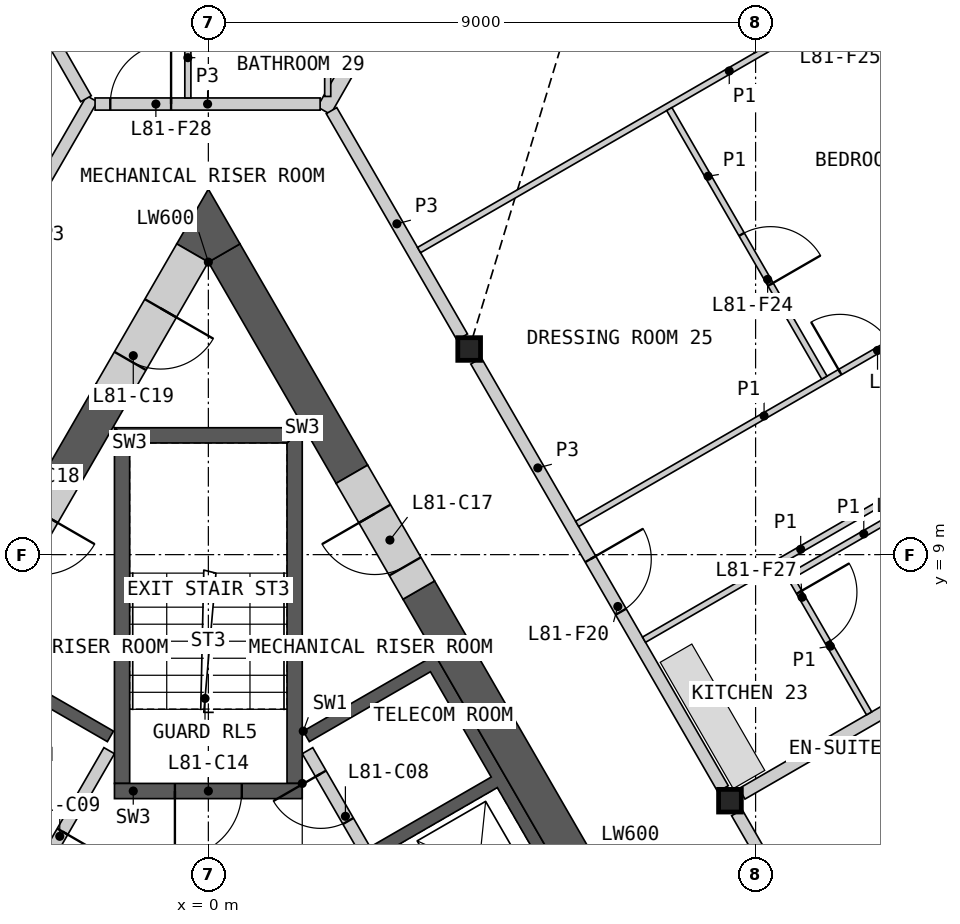
"""IFC4 building model, lengths in metres.
Left out: names, types, materials, properties, quantities, classifications, styles, units other than length and angle.
Written with IfcOpenShell. Run it as: python <this file> out.ifc"""

import sys

from ifc_helpers import new_model, si_unit, direction, frame, frame_2d, origin, origin_2d, place, context, subcontext, project, spatial, polyline, rectangle, i_section, outline, extrude, element, fill, save


model = new_model("IFC4")
c1 = context("Model", 3, precision=1e-05, world=origin(), true_north=direction((0.0, 1.0)))
c2 = subcontext(c1, "Body", "Model", "MODEL_VIEW")
j1 = project(units=[si_unit("LENGTHUNIT", "METRE"), si_unit("PLANEANGLEUNIT", "RADIAN")], contexts=[c1])
p1 = place(None, origin())
s1 = spatial("IfcSite", under=j1, at=p1, CompositionType="ELEMENT")
p2 = place(p1, origin())
s2 = spatial("IfcBuilding", under=s1, at=p2, CompositionType="ELEMENT")
p3 = place(p2, frame((0.0, 0.0, 364.4)))
s3 = spatial("IfcBuildingStorey", under=s2, at=p3, CompositionType="ELEMENT", Elevation=364.4)
for number, where, z_axis, x_axis in (
    (1, (8.578, 4.953, 0.0), (0.0, 0.0, 1.0), (1.0, 0.0, 0.0)),
    (2, (4.289, 12.382, 0.0), (0.0, 0.0, 1.0), (1.0, 0.0, 0.0)),
):
    element("IfcColumn", number, at=place(p3, frame(where, z_axis=z_axis, x_axis=x_axis)), inside=s3, PredefinedType="COLUMN", context=c2, shape_type="SweptSolid", body=[
        extrude(i_section(OverallWidth=0.374, OverallDepth=0.372, WebThickness=0.016, FlangeThickness=0.026, at=origin_2d()), origin(), (0.0, 0.0, 1.0), 3.4),
    ])
p4 = place(p3, origin())
e3 = element("IfcWall", 3, at=p4, inside=s3, PredefinedType="SHEAR", context=c2, shape_type="SweptSolid", body=[
    extrude(outline(polyline([(1.561, 6.097), (3.731, 7.35), (8.231, -0.444), (6.061, -1.697), (5.96, -1.524), (7.952, -0.374), (6.952, 1.358), (4.96, 0.208), (4.861, 0.381), (6.852, 1.531), (5.852, 3.263), (3.861, 2.113), (3.76, 2.287), (5.752, 3.437), (4.752, 5.169), (2.76, 4.019), (2.66, 4.192), (4.652, 5.342), (3.652, 7.074), (1.66, 5.924), (1.561, 6.097)])), origin(), (0.0, 0.0, 1.0), 3.1),
])
p5 = place(p3, frame((5.817, -1.476, 0.0), z_axis=(0.0, 0.0, 1.0), x_axis=(-0.500002616675, 0.866023893041, 0.0)))
e4 = element("IfcWall", 4, at=p5, inside=s3, PredefinedType="SOLIDWALL", context=c2, shape_type="SweptSolid", body=[
    extrude(rectangle(XDim=8.373, YDim=0.2, at=frame_2d((4.187, 0.0))), origin(), (0.0, 0.0, 1.0), 3.1),
])
p6 = place(p5, frame((0.337, 0.0, 0.0)))
e5 = element("IfcOpeningElement", 5, at=p6, cuts=e4, PredefinedType="OPENING", context=c2, shape_type="SweptSolid", body=[
    extrude(rectangle(XDim=1.1, YDim=2.1, at=frame_2d((0.55, 1.05))), frame((0.0, 0.11, 0.0), z_axis=(0.0, -1.0, 0.0), x_axis=(1.0, 0.0, 0.0)), (0.0, 0.0, 1.0), 0.22),
])
p7 = place(p5, frame((2.537, 0.0, 0.0)))
e6 = element("IfcOpeningElement", 6, at=p7, cuts=e4, PredefinedType="OPENING", context=c2, shape_type="SweptSolid", body=[
    extrude(rectangle(XDim=1.1, YDim=2.1, at=frame_2d((0.55, 1.05))), frame((0.0, 0.11, 0.0), z_axis=(0.0, -1.0, 0.0), x_axis=(1.0, 0.0, 0.0)), (0.0, 0.0, 1.0), 0.22),
])
p8 = place(p5, frame((4.737, 0.0, 0.0)))
e7 = element("IfcOpeningElement", 7, at=p8, cuts=e4, PredefinedType="OPENING", context=c2, shape_type="SweptSolid", body=[
    extrude(rectangle(XDim=1.1, YDim=2.1, at=frame_2d((0.55, 1.05))), frame((0.0, 0.11, 0.0), z_axis=(0.0, -1.0, 0.0), x_axis=(1.0, 0.0, 0.0)), (0.0, 0.0, 1.0), 0.22),
])
p9 = place(p5, frame((7.037, 0.0, 0.0)))
e8 = element("IfcOpeningElement", 8, at=p9, cuts=e4, PredefinedType="OPENING", context=c2, shape_type="SweptSolid", body=[
    extrude(rectangle(XDim=0.9, YDim=2.1, at=frame_2d((0.45, 1.05))), frame((0.0, 0.11, 0.0), z_axis=(0.0, -1.0, 0.0), x_axis=(1.0, 0.0, 0.0)), (0.0, 0.0, 1.0), 0.22),
])
p10 = place(p3, origin())
e9 = element("IfcWall", 9, at=p10, inside=s3, PredefinedType="SHEAR", context=c2, shape_type="SweptSolid", body=[
    extrude(outline(polyline([(-4.96, 0.208), (-7.131, 1.461), (-3.731, 7.35), (-1.561, 6.097), (-1.66, 5.924), (-3.652, 7.074), (-5.752, 3.437), (-3.76, 2.287), (-3.861, 2.113), (-5.852, 3.263), (-6.852, 1.531), (-4.861, 0.381), (-4.96, 0.208)])), origin(), (0.0, 0.0, 1.0), 3.1),
])
p11 = place(p3, frame((-1.631, 5.776, 0.0), z_axis=(0.0, 0.0, 1.0), x_axis=(-0.499992876559, -0.866029516466, 0.0)))
e10 = element("IfcWall", 10, at=p11, inside=s3, PredefinedType="SOLIDWALL", context=c2, shape_type="SweptSolid", body=[
    extrude(rectangle(XDim=6.486, YDim=0.2, at=frame_2d((3.243, 0.0))), origin(), (0.0, 0.0, 1.0), 3.1),
])
p12 = place(p11, frame((1.537, 0.0, 0.0)))
e11 = element("IfcOpeningElement", 11, at=p12, cuts=e10, PredefinedType="OPENING", context=c2, shape_type="SweptSolid", body=[
    extrude(rectangle(XDim=0.9, YDim=2.1, at=frame_2d((0.45, 1.05))), frame((0.0, 0.11, 0.0), z_axis=(0.0, -1.0, 0.0), x_axis=(1.0, 0.0, 0.0)), (0.0, 0.0, 1.0), 0.22),
])
p13 = place(p11, frame((4.837, 0.0, 0.0)))
e12 = element("IfcOpeningElement", 12, at=p13, cuts=e10, PredefinedType="OPENING", context=c2, shape_type="SweptSolid", body=[
    extrude(rectangle(XDim=0.9, YDim=2.1, at=frame_2d((0.45, 1.05))), frame((0.0, 0.11, 0.0), z_axis=(0.0, -1.0, 0.0), x_axis=(1.0, 0.0, 0.0)), (0.0, 0.0, 1.0), 0.22),
])
p14 = place(p3, origin())
e13 = element("IfcWall", 13, at=p14, inside=s3, PredefinedType="SHEAR", context=c2, shape_type="SweptSolid", body=[
    extrude(outline(polyline([(1.544, 5.237), (1.544, 11.087), (1.294, 10.837), (1.294, 5.237), (1.544, 5.237)])), origin(), (0.0, 0.0, 1.0), 3.1),
])
p15 = place(p3, origin())
e14 = element("IfcWall", 14, at=p15, inside=s3, PredefinedType="SHEAR", context=c2, shape_type="SweptSolid", body=[
    extrude(outline(polyline([(1.544, 11.087), (-1.544, 11.087), (-1.294, 10.837), (1.294, 10.837), (1.544, 11.087)])), origin(), (0.0, 0.0, 1.0), 3.1),
])
p16 = place(p3, origin())
e15 = element("IfcWall", 15, at=p16, inside=s3, PredefinedType="SHEAR", context=c2, shape_type="SweptSolid", body=[
    extrude(outline(polyline([(-1.294, 10.837), (-1.544, 11.087), (-1.544, 5.237), (-1.294, 5.237), (-1.294, 10.837)])), origin(), (0.0, 0.0, 1.0), 3.1),
])
p17 = place(p3, frame((1.544, 5.112, 0.0), z_axis=(0.0, 0.0, 1.0), x_axis=(-1.0, 0.0, 0.0)))
e16 = element("IfcWall", 16, at=p17, inside=s3, PredefinedType="SHEAR", context=c2, shape_type="SweptSolid", body=[
    extrude(rectangle(XDim=3.088, YDim=0.25, at=frame_2d((1.544, 0.0))), origin(), (0.0, 0.0, 1.0), 3.1),
])
p18 = place(p17, frame((0.994, 0.0, 0.0)))
e17 = element("IfcOpeningElement", 17, at=p18, cuts=e16, PredefinedType="OPENING", context=c2, shape_type="SweptSolid", body=[
    extrude(rectangle(XDim=1.1, YDim=2.1, at=frame_2d((0.55, 1.05))), frame((0.0, 0.135, 0.0), z_axis=(0.0, -1.0, 0.0), x_axis=(1.0, 0.0, 0.0)), (0.0, 0.0, 1.0), 0.27),
])
p19 = place(p3, frame((8.686, -0.634, 0.0), z_axis=(0.0, 0.0, 1.0), x_axis=(-0.50001836461, 0.866014800712, 0.0)))
e18 = element("IfcWall", 18, at=p19, inside=s3, PredefinedType="SHEAR", context=c2, shape_type="SweptSolid", body=[
    extrude(rectangle(XDim=10.451, YDim=0.6, at=frame_2d((5.225, 0.0))), origin(), (0.0, 0.0, 1.0), 3.1),
])
p20 = place(p3, frame((2.361, 10.322, 0.0), z_axis=(0.0, 0.0, 1.0), x_axis=(-0.500000735859, 0.866024978935, 0.0)))
e19 = element("IfcWall", 19, at=p20, inside=s3, PredefinedType="SHEAR", context=c2, shape_type="SweptSolid", body=[
    extrude(rectangle(XDim=4.202, YDim=0.6, at=frame_2d((2.101, 0.0))), origin(), (0.0, 0.0, 1.0), 3.1),
])
p21 = place(p3, frame((-1.59, 11.658, 0.0), z_axis=(0.0, 0.0, 1.0), x_axis=(-0.500037594623, -0.866003697431, 0.0)))
e20 = element("IfcWall", 20, at=p21, inside=s3, PredefinedType="SHEAR", context=c2, shape_type="SweptSolid", body=[
    extrude(rectangle(XDim=1.542, YDim=0.6, at=frame_2d((0.771, 0.0))), origin(), (0.0, 0.0, 1.0), 3.1),
])
p22 = place(p3, origin())
e21 = element("IfcWall", 21, at=p22, inside=s3, PredefinedType="SHEAR", context=c2, shape_type="SweptSolid", body=[
    extrude(outline(polyline([(0.0, 13.811), (-0.52, 14.111), (0.0, 15.011), (0.52, 14.111), (0.0, 13.811)])), origin(), (0.0, 0.0, 1.0), 3.1),
])
p23 = place(p3, frame((3.461, 8.417, 0.0), z_axis=(0.0, 0.0, 1.0), x_axis=(-0.499946605688, 0.86605622881, 0.0)))
e22 = element("IfcWall", 22, at=p23, inside=s3, PredefinedType="SHEAR", context=c2, shape_type="SweptSolid", body=[
    extrude(rectangle(XDim=2.2, YDim=0.6, at=frame_2d((1.1, 0.0))), origin(), (0.0, 0.0, 1.0), 3.1),
])
p24 = place(p23, frame((0.45, 0.0, 0.0)))
e23 = element("IfcOpeningElement", 23, at=p24, cuts=e22, PredefinedType="OPENING", context=c2, shape_type="SweptSolid", body=[
    extrude(rectangle(XDim=1.0, YDim=2.1, at=frame_2d((0.5, 1.05))), frame((0.0, 0.31, 0.0), z_axis=(0.0, -1.0, 0.0), x_axis=(1.0, 0.0, 0.0)), (0.0, 0.0, 1.0), 0.62),
])
p25 = place(p3, frame((-2.361, 10.322, 0.0), z_axis=(0.0, 0.0, 1.0), x_axis=(-0.499946605688, -0.86605622881, 0.0)))
e24 = element("IfcWall", 24, at=p25, inside=s3, PredefinedType="SHEAR", context=c2, shape_type="SweptSolid", body=[
    extrude(rectangle(XDim=2.2, YDim=0.6, at=frame_2d((1.1, 0.0))), origin(), (0.0, 0.0, 1.0), 3.1),
])
p26 = place(p25, frame((0.75, 0.0, 0.0)))
e25 = element("IfcOpeningElement", 25, at=p26, cuts=e24, PredefinedType="OPENING", context=c2, shape_type="SweptSolid", body=[
    extrude(rectangle(XDim=1.0, YDim=2.1, at=frame_2d((0.5, 1.05))), frame((0.0, 0.31, 0.0), z_axis=(0.0, -1.0, 0.0), x_axis=(1.0, 0.0, 0.0)), (0.0, 0.0, 1.0), 0.62),
])
p27 = place(p3, frame((-0.26, 13.961, 0.0), z_axis=(0.0, 0.0, 1.0), x_axis=(-0.49997936161, -0.866037319036, 0.0)))
e26 = element("IfcWall", 26, at=p27, inside=s3, PredefinedType="SHEAR", context=c2, shape_type="SweptSolid", body=[
    extrude(rectangle(XDim=2.66, YDim=0.6, at=frame_2d((1.33, 0.0))), origin(), (0.0, 0.0, 1.0), 3.1),
])
p28 = place(p27, frame((1.05, 0.0, 0.0)))
e27 = element("IfcOpeningElement", 27, at=p28, cuts=e26, PredefinedType="OPENING", context=c2, shape_type="SweptSolid", body=[
    extrude(rectangle(XDim=1.0, YDim=2.1, at=frame_2d((0.5, 1.05))), frame((0.0, 0.31, 0.0), z_axis=(0.0, -1.0, 0.0), x_axis=(1.0, 0.0, 0.0)), (0.0, 0.0, 1.0), 0.62),
])
p29 = place(p3, frame((1.901, 16.302, 0.0), z_axis=(0.0, 0.0, 1.0), x_axis=(0.496368960053, 0.86811166073, 0.0)))
e28 = element("IfcWall", 28, at=p29, inside=s3, PredefinedType="PARTITIONING", context=c2, shape_type="SweptSolid", body=[
    extrude(rectangle(XDim=14.972, YDim=0.25, at=frame_2d((7.486, 0.0))), origin(), (0.0, 0.0, 1.0), 2.33),
])
p30 = place(p3, frame((4.403, 12.185, 0.0), z_axis=(0.0, 0.0, 1.0), x_axis=(0.499992155518, -0.866029932751, 0.0)))
e29 = element("IfcWall", 29, at=p30, inside=s3, PredefinedType="PARTITIONING", context=c2, shape_type="SweptSolid", body=[
    extrude(rectangle(XDim=8.123, YDim=0.2, at=frame_2d((4.062, 0.0))), origin(), (0.0, 0.0, 1.0), 3.1),
])
p31 = place(p30, frame((3.762, 0.0, 0.0)))
e30 = element("IfcOpeningElement", 30, at=p31, cuts=e29, PredefinedType="OPENING", context=c2, shape_type="SweptSolid", body=[
    extrude(rectangle(XDim=1.0, YDim=2.1, at=frame_2d((0.5, 1.05))), frame((0.0, 0.11, 0.0), z_axis=(0.0, -1.0, 0.0), x_axis=(1.0, 0.0, 0.0)), (0.0, 0.0, 1.0), 0.22),
])
p32 = place(p3, frame((8.692, 4.756, 0.0), z_axis=(0.0, 0.0, 1.0), x_axis=(0.500001682468, -0.866024432409, 0.0)))
e31 = element("IfcWall", 31, at=p32, inside=s3, PredefinedType="PARTITIONING", context=c2, shape_type="SweptSolid", body=[
    extrude(rectangle(XDim=8.124, YDim=0.2, at=frame_2d((4.062, 0.0))), origin(), (0.0, 0.0, 1.0), 3.1),
])
p33 = place(p32, frame((3.587, 0.0, 0.0)))
e32 = element("IfcOpeningElement", 32, at=p33, cuts=e31, PredefinedType="OPENING", context=c2, shape_type="SweptSolid", body=[
    extrude(rectangle(XDim=0.95, YDim=2.1, at=frame_2d((0.475, 1.05))), frame((0.0, 0.11, 0.0), z_axis=(0.0, -1.0, 0.0), x_axis=(1.0, 0.0, 0.0)), (0.0, 0.0, 1.0), 0.22),
])
p34 = place(p3, frame((2.025, 16.303, 0.0), z_axis=(0.0, 0.0, 1.0), x_axis=(0.500004215162, -0.866022970146, 0.0)))
e33 = element("IfcWall", 33, at=p34, inside=s3, PredefinedType="PARTITIONING", context=c2, shape_type="SweptSolid", body=[
    extrude(rectangle(XDim=4.3, YDim=0.2, at=frame_2d((2.15, 0.0))), origin(), (0.0, 0.0, 1.0), 3.1),
])
p35 = place(p3, frame((-4.176, 12.579, 0.0), z_axis=(0.0, 0.0, 1.0), x_axis=(0.499974648164, 0.866040040179, 0.0)))
e34 = element("IfcWall", 34, at=p35, inside=s3, PredefinedType="PARTITIONING", context=c2, shape_type="SweptSolid", body=[
    extrude(rectangle(XDim=4.525, YDim=0.2, at=frame_2d((2.263, 0.0))), origin(), (0.0, 0.0, 1.0), 3.1),
])
p36 = place(p3, frame((-1.863, 16.411, 0.0), z_axis=(0.0, 0.0, 1.0), x_axis=(1.0, 0.0, 0.0)))
e35 = element("IfcWall", 35, at=p36, inside=s3, PredefinedType="PARTITIONING", context=c2, shape_type="SweptSolid", body=[
    extrude(rectangle(XDim=3.701, YDim=0.2, at=frame_2d((1.851, 0.0))), origin(), (0.0, 0.0, 1.0), 3.1),
])
p37 = place(p36, frame((0.25, 0.0, 0.0)))
e36 = element("IfcOpeningElement", 36, at=p37, cuts=e35, PredefinedType="OPENING", context=c2, shape_type="SweptSolid", body=[
    extrude(rectangle(XDim=1.0, YDim=2.1, at=frame_2d((0.5, 1.05))), frame((0.0, 0.11, 0.0), z_axis=(0.0, -1.0, 0.0), x_axis=(1.0, 0.0, 0.0)), (0.0, 0.0, 1.0), 0.22),
])
p38 = place(p3, frame((-9.362, 29.352, 0.0), z_axis=(0.0, 0.0, 1.0), x_axis=(0.496351997927, -0.868121359116, 0.0)))
e37 = element("IfcWall", 37, at=p38, inside=s3, PredefinedType="PARTITIONING", context=c2, shape_type="SweptSolid", body=[
    extrude(rectangle(XDim=14.807, YDim=0.2, at=frame_2d((7.404, 0.0))), origin(), (0.0, 0.0, 1.0), 2.33),
])
p39 = place(p3, frame((8.775, 5.066, 0.0), z_axis=(0.0, 0.0, 1.0), x_axis=(0.866023724155, 0.500002909193, 0.0)))
e38 = element("IfcWall", 38, at=p39, inside=s3, PredefinedType="PARTITIONING", context=c2, shape_type="SweptSolid", body=[
    extrude(rectangle(XDim=11.655, YDim=0.2, at=frame_2d((5.827, 0.0))), origin(), (0.0, 0.0, 1.0), 2.33),
])
p40 = place(p3, frame((3.465, 14.01, 0.0), z_axis=(0.0, 0.0, 1.0), x_axis=(0.866032376801, 0.499987922186, 0.0)))
e39 = element("IfcWall", 39, at=p40, inside=s3, PredefinedType="PARTITIONING", context=c2, shape_type="SweptSolid", body=[
    extrude(rectangle(XDim=11.782, YDim=0.1, at=frame_2d((5.891, 0.0))), origin(), (0.0, 0.0, 1.0), 2.33),
])
p41 = place(p40, frame((6.67, 0.0, 0.0)))
e40 = element("IfcOpeningElement", 40, at=p41, cuts=e39, PredefinedType="OPENING", context=c2, shape_type="SweptSolid", body=[
    extrude(rectangle(XDim=0.95, YDim=2.1, at=frame_2d((0.475, 1.05))), frame((0.0, 0.06, 0.0), z_axis=(0.0, -1.0, 0.0), x_axis=(1.0, 0.0, 0.0)), (0.0, 0.0, 1.0), 0.12),
])
p42 = place(p3, frame((6.065, 9.506, 0.0), z_axis=(0.0, 0.0, 1.0), x_axis=(0.866018949465, 0.500011179042, 0.0)))
e41 = element("IfcWall", 41, at=p42, inside=s3, PredefinedType="PARTITIONING", context=c2, shape_type="SweptSolid", body=[
    extrude(rectangle(XDim=7.1, YDim=0.1, at=frame_2d((3.55, 0.0))), origin(), (0.0, 0.0, 1.0), 2.33),
])
p43 = place(p42, frame((4.992, 0.0, 0.0)))
e42 = element("IfcOpeningElement", 42, at=p43, cuts=e41, PredefinedType="OPENING", context=c2, shape_type="SweptSolid", body=[
    extrude(rectangle(XDim=0.95, YDim=2.1, at=frame_2d((0.475, 1.05))), frame((0.0, 0.06, 0.0), z_axis=(0.0, -1.0, 0.0), x_axis=(1.0, 0.0, 0.0)), (0.0, 0.0, 1.0), 0.12),
])
p44 = place(p3, frame((5.787, 22.882, 0.0), z_axis=(0.0, 0.0, 1.0), x_axis=(0.500001069878, -0.866024786089, 0.0)))
e43 = element("IfcWall", 43, at=p44, inside=s3, PredefinedType="PARTITIONING", context=c2, shape_type="SweptSolid", body=[
    extrude(rectangle(XDim=6.473, YDim=0.1, at=frame_2d((3.236, 0.0))), origin(), (0.0, 0.0, 1.0), 2.33),
])
p45 = place(p44, frame((2.46, 0.0, 0.0)))
e44 = element("IfcOpeningElement", 44, at=p45, cuts=e43, PredefinedType="OPENING", context=c2, shape_type="SweptSolid", body=[
    extrude(rectangle(XDim=0.95, YDim=2.1, at=frame_2d((0.475, 1.05))), frame((0.0, 0.06, 0.0), z_axis=(0.0, -1.0, 0.0), x_axis=(1.0, 0.0, 0.0)), (0.0, 0.0, 1.0), 0.12),
])
p46 = place(p3, frame((7.165, 7.601, 0.0), z_axis=(0.0, 0.0, 1.0), x_axis=(0.866017493347, 0.500013701029, 0.0)))
e45 = element("IfcWall", 45, at=p46, inside=s3, PredefinedType="PARTITIONING", context=c2, shape_type="SweptSolid", body=[
    extrude(rectangle(XDim=5.95, YDim=0.1, at=frame_2d((2.975, 0.0))), origin(), (0.0, 0.0, 1.0), 2.33),
])
p47 = place(p3, frame((7.581, 16.328, 0.0), z_axis=(0.0, 0.0, 1.0), x_axis=(0.500005610874, -0.86602216432, 0.0)))
e46 = element("IfcWall", 46, at=p47, inside=s3, PredefinedType="PARTITIONING", context=c2, shape_type="SweptSolid", body=[
    extrude(rectangle(XDim=5.1, YDim=0.1, at=frame_2d((2.55, 0.0))), origin(), (0.0, 0.0, 1.0), 2.33),
])
p48 = place(p47, frame((2.379, 0.0, 0.0)))
e47 = element("IfcOpeningElement", 47, at=p48, cuts=e46, PredefinedType="OPENING", context=c2, shape_type="SweptSolid", body=[
    extrude(rectangle(XDim=0.95, YDim=2.1, at=frame_2d((0.475, 1.05))), frame((0.0, 0.06, 0.0), z_axis=(0.0, -1.0, 0.0), x_axis=(1.0, 0.0, 0.0)), (0.0, 0.0, 1.0), 0.12),
])
p49 = place(p3, frame((9.523, 8.616, 0.0), z_axis=(0.0, 0.0, 1.0), x_axis=(0.866032775405, 0.499987231761, 0.0)))
e48 = element("IfcWall", 48, at=p49, inside=s3, PredefinedType="PARTITIONING", context=c2, shape_type="SweptSolid", body=[
    extrude(rectangle(XDim=2.9, YDim=0.1, at=frame_2d((1.45, 0.0))), origin(), (0.0, 0.0, 1.0), 2.33),
])
p50 = place(p3, frame((-0.337, 16.511, 0.0), z_axis=(0.0, 0.0, 1.0), x_axis=(0.0, 1.0, 0.0)))
e49 = element("IfcWall", 49, at=p50, inside=s3, PredefinedType="PARTITIONING", context=c2, shape_type="SweptSolid", body=[
    extrude(rectangle(XDim=2.65, YDim=0.1, at=frame_2d((1.325, 0.0))), origin(), (0.0, 0.0, 1.0), 2.33),
])
p51 = place(p50, frame((1.014, 0.0, 0.0)))
e50 = element("IfcOpeningElement", 50, at=p51, cuts=e49, PredefinedType="OPENING", context=c2, shape_type="SweptSolid", body=[
    extrude(rectangle(XDim=0.95, YDim=2.1, at=frame_2d((0.475, 1.05))), frame((0.0, 0.06, 0.0), z_axis=(0.0, -1.0, 0.0), x_axis=(1.0, 0.0, 0.0)), (0.0, 0.0, 1.0), 0.12),
])
p52 = place(p3, frame((1.963, 16.536, 0.0), z_axis=(0.0, 0.0, 1.0), x_axis=(0.0, 1.0, 0.0)))
e51 = element("IfcWall", 51, at=p52, inside=s3, PredefinedType="PARTITIONING", context=c2, shape_type="SweptSolid", body=[
    extrude(rectangle(XDim=2.625, YDim=0.1, at=frame_2d((1.312, 0.0))), origin(), (0.0, 0.0, 1.0), 2.33),
])
p53 = place(p3, frame((9.592, 8.598, 0.0), z_axis=(0.0, 0.0, 1.0), x_axis=(0.499990435942, -0.866030925526, 0.0)))
e52 = element("IfcWall", 52, at=p53, inside=s3, PredefinedType="PARTITIONING", context=c2, shape_type="SweptSolid", body=[
    extrude(rectangle(XDim=2.55, YDim=0.1, at=frame_2d((1.275, 0.0))), origin(), (0.0, 0.0, 1.0), 2.33),
])
p54 = place(p53, frame((0.25, 0.0, 0.0)))
e53 = element("IfcOpeningElement", 53, at=p54, cuts=e52, PredefinedType="OPENING", context=c2, shape_type="SweptSolid", body=[
    extrude(rectangle(XDim=0.95, YDim=2.1, at=frame_2d((0.475, 1.05))), frame((0.0, 0.06, 0.0), z_axis=(0.0, -1.0, 0.0), x_axis=(1.0, 0.0, 0.0)), (0.0, 0.0, 1.0), 0.12),
])
p55 = place(p9, origin())
e54 = element("IfcDoor", 54, at=p55, inside=s3, OperationType="SINGLE_SWING_RIGHT", PredefinedType="DOOR", context=c2, shape_type="SweptSolid", body=[
    extrude(rectangle(XDim=0.9, YDim=2.1, at=frame_2d((0.45, 1.05))), frame((0.0, 0.025, 0.0), z_axis=(0.0, -1.0, 0.0), x_axis=(1.0, 0.0, 0.0)), (0.0, 0.0, 1.0), 0.05),
])
fill(e8, e54)
p56 = place(p12, origin())
e55 = element("IfcDoor", 55, at=p56, inside=s3, OperationType="SINGLE_SWING_LEFT", PredefinedType="DOOR", context=c2, shape_type="SweptSolid", body=[
    extrude(rectangle(XDim=0.9, YDim=2.1, at=frame_2d((0.45, 1.05))), frame((0.0, 0.025, 0.0), z_axis=(0.0, -1.0, 0.0), x_axis=(1.0, 0.0, 0.0)), (0.0, 0.0, 1.0), 0.05),
])
fill(e11, e55)
p57 = place(p18, origin())
e56 = element("IfcDoor", 56, at=p57, inside=s3, OperationType="SINGLE_SWING_RIGHT", PredefinedType="DOOR", context=c2, shape_type="SweptSolid", body=[
    extrude(rectangle(XDim=1.1, YDim=2.1, at=frame_2d((0.55, 1.05))), frame((0.0, 0.025, 0.0), z_axis=(0.0, -1.0, 0.0), x_axis=(1.0, 0.0, 0.0)), (0.0, 0.0, 1.0), 0.05),
])
fill(e17, e56)
p58 = place(p24, origin())
e57 = element("IfcDoor", 57, at=p58, inside=s3, OperationType="SINGLE_SWING_RIGHT", PredefinedType="DOOR", context=c2, shape_type="SweptSolid", body=[
    extrude(rectangle(XDim=1.0, YDim=2.1, at=frame_2d((0.5, 1.05))), frame((0.0, 0.055, 0.0), z_axis=(0.0, -1.0, 0.0), x_axis=(1.0, 0.0, 0.0)), (0.0, 0.0, 1.0), 0.05),
])
fill(e23, e57)
p59 = place(p28, origin())
e58 = element("IfcDoor", 58, at=p59, inside=s3, OperationType="SINGLE_SWING_LEFT", PredefinedType="DOOR", context=c2, shape_type="SweptSolid", body=[
    extrude(rectangle(XDim=1.0, YDim=2.1, at=frame_2d((0.5, 1.05))), frame((0.0, 0.055, 0.0), z_axis=(0.0, -1.0, 0.0), x_axis=(1.0, 0.0, 0.0)), (0.0, 0.0, 1.0), 0.05),
])
fill(e27, e58)
p60 = place(p31, origin())
e59 = element("IfcDoor", 59, at=p60, inside=s3, OperationType="SINGLE_SWING_LEFT", PredefinedType="DOOR", context=c2, shape_type="SweptSolid", body=[
    extrude(rectangle(XDim=1.0, YDim=2.1, at=frame_2d((0.5, 1.05))), frame((0.0, 0.025, 0.0), z_axis=(0.0, -1.0, 0.0), x_axis=(1.0, 0.0, 0.0)), (0.0, 0.0, 1.0), 0.05),
])
fill(e30, e59)
p61 = place(p43, origin())
e60 = element("IfcDoor", 60, at=p61, inside=s3, OperationType="SINGLE_SWING_LEFT", PredefinedType="DOOR", context=c2, shape_type="SweptSolid", body=[
    extrude(rectangle(XDim=0.95, YDim=2.1, at=frame_2d((0.475, 1.05))), frame((0.0, 0.025, 0.0), z_axis=(0.0, -1.0, 0.0), x_axis=(1.0, 0.0, 0.0)), (0.0, 0.0, 1.0), 0.05),
])
fill(e42, e60)
p62 = place(p48, origin())
e61 = element("IfcDoor", 61, at=p62, inside=s3, OperationType="SINGLE_SWING_RIGHT", PredefinedType="DOOR", context=c2, shape_type="SweptSolid", body=[
    extrude(rectangle(XDim=0.95, YDim=2.1, at=frame_2d((0.475, 1.05))), frame((0.0, 0.025, 0.0), z_axis=(0.0, -1.0, 0.0), x_axis=(1.0, 0.0, 0.0)), (0.0, 0.0, 1.0), 0.05),
])
fill(e47, e61)
p63 = place(p54, origin())
e62 = element("IfcDoor", 62, at=p63, inside=s3, OperationType="SINGLE_SWING_LEFT", PredefinedType="DOOR", context=c2, shape_type="SweptSolid", body=[
    extrude(rectangle(XDim=0.95, YDim=2.1, at=frame_2d((0.475, 1.05))), frame((0.0, 0.025, 0.0), z_axis=(0.0, -1.0, 0.0), x_axis=(1.0, 0.0, 0.0)), (0.0, 0.0, 1.0), 0.05),
])
fill(e53, e62)
p64 = place(p37, origin())
e63 = element("IfcDoor", 63, at=p64, inside=s3, OperationType="SINGLE_SWING_RIGHT", PredefinedType="DOOR", context=c2, shape_type="SweptSolid", body=[
    extrude(rectangle(XDim=1.0, YDim=2.1, at=frame_2d((0.5, 1.05))), frame((0.0, 0.025, 0.0), z_axis=(0.0, -1.0, 0.0), x_axis=(1.0, 0.0, 0.0)), (0.0, 0.0, 1.0), 0.05),
])
fill(e36, e63)
save(model, sys.argv[1])
